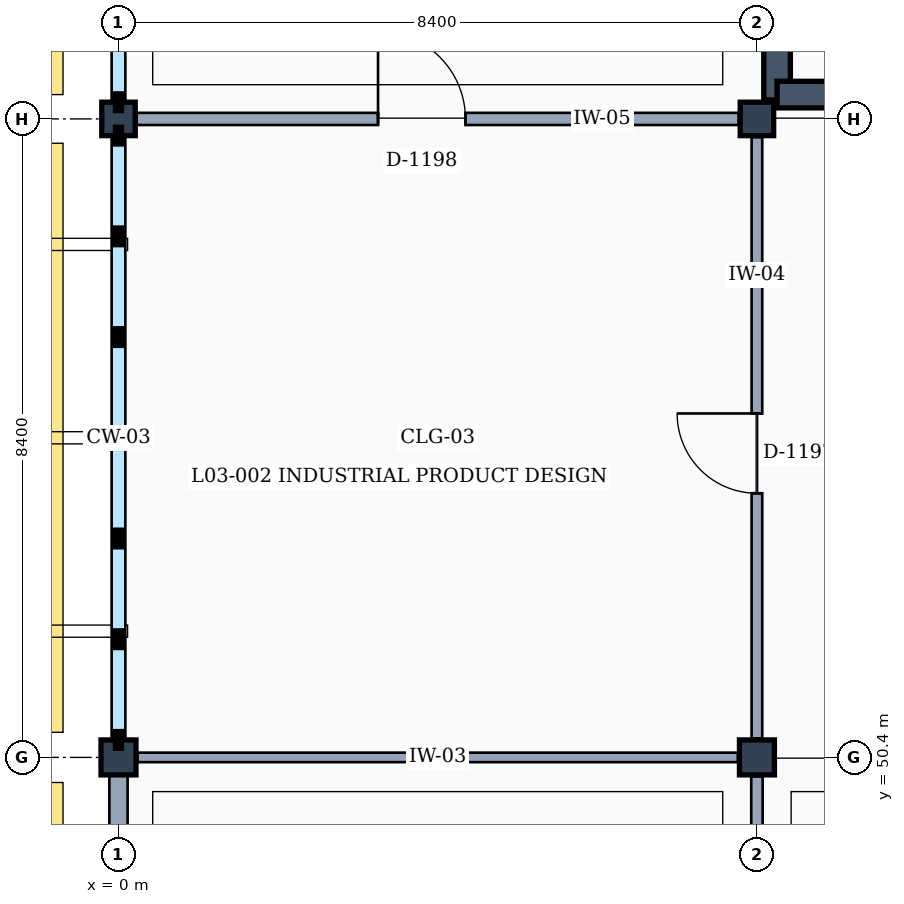
"""IFC4 building model, lengths in metres.
Left out: names, types, materials, properties, quantities, classifications, styles, units other than length and angle.
Written with IfcOpenShell. Run it as: python <this file> out.ifc"""

import sys

from ifc_helpers import new_model, si_unit, direction, frame, frame_2d, origin, origin_2d, place, context, subcontext, project, spatial, rectangle, extrude, element, fill, save


model = new_model("IFC4")
c1 = context("Model", 3, precision=1e-05, world=origin(), true_north=direction((0.0, 1.0)))
c2 = subcontext(c1, "Body", "Model", "MODEL_VIEW")
j1 = project(units=[si_unit("LENGTHUNIT", "METRE"), si_unit("PLANEANGLEUNIT", "RADIAN")], contexts=[c1])
p1 = place(None, origin())
s1 = spatial("IfcSite", under=j1, at=p1, CompositionType="ELEMENT")
p2 = place(p1, origin())
s2 = spatial("IfcBuilding", under=s1, at=p2, CompositionType="ELEMENT")
p3 = place(p2, frame((0.0, 0.0, 13.8)))
s3 = spatial("IfcBuildingStorey", under=s2, at=p3, CompositionType="ELEMENT", Elevation=13.8)
p4 = place(p3, frame((0.0, 50.4, 0.0), z_axis=(0.0, 0.0, 1.0), x_axis=(1.0, 0.0, 0.0)))
e1 = element("IfcColumn", 1, at=p4, inside=s3, PredefinedType="COLUMN", context=c2, shape_type="SweptSolid", body=[
    extrude(rectangle(XDim=0.46, YDim=0.46, at=origin_2d()), origin(), (0.0, 0.0, 1.0), 4.2),
])
p5 = place(p3, frame((0.0, 58.8, 0.0), z_axis=(0.0, 0.0, 1.0), x_axis=(1.0, 0.0, 0.0)))
e2 = element("IfcColumn", 2, at=p5, inside=s3, PredefinedType="COLUMN", context=c2, shape_type="SweptSolid", body=[
    extrude(rectangle(XDim=0.44, YDim=0.44, at=origin_2d()), origin(), (0.0, 0.0, 1.0), 4.2),
])
p6 = place(p3, frame((8.4, 50.4, 0.0), z_axis=(0.0, 0.0, 1.0), x_axis=(1.0, 0.0, 0.0)))
e3 = element("IfcColumn", 3, at=p6, inside=s3, PredefinedType="COLUMN", context=c2, shape_type="SweptSolid", body=[
    extrude(rectangle(XDim=0.46, YDim=0.46, at=origin_2d()), origin(), (0.0, 0.0, 1.0), 4.2),
])
p7 = place(p3, frame((8.4, 58.8, 0.0), z_axis=(0.0, 0.0, 1.0), x_axis=(1.0, 0.0, 0.0)))
e4 = element("IfcColumn", 4, at=p7, inside=s3, PredefinedType="COLUMN", context=c2, shape_type="SweptSolid", body=[
    extrude(rectangle(XDim=0.44, YDim=0.44, at=origin_2d()), origin(), (0.0, 0.0, 1.0), 4.2),
])
p8 = place(p3, frame((0.0, 42.17, 0.0), z_axis=(0.0, 0.0, 1.0), x_axis=(0.0, 1.0, 0.0)))
e5 = element("IfcWall", 5, at=p8, inside=s3, PredefinedType="SOLIDWALL", context=c2, shape_type="SweptSolid", body=[
    extrude(rectangle(XDim=8.0, YDim=0.24, at=frame_2d((4.0, 0.0))), origin(), (0.0, 0.0, 1.0), 3.36),
])
p9 = place(p8, frame((3.2, 0.0, 0.9)))
e6 = element("IfcOpeningElement", 6, at=p9, cuts=e5, PredefinedType="OPENING", context=c2, shape_type="SweptSolid", body=[
    extrude(rectangle(XDim=1.6, YDim=2.0, at=frame_2d((0.8, 1.0))), frame((0.0, 0.13, 0.0), z_axis=(0.0, -1.0, 0.0), x_axis=(1.0, 0.0, 0.0)), (0.0, 0.0, 1.0), 0.26),
])
p10 = place(p3, frame((8.665, 59.05, 0.0), z_axis=(0.0, 0.0, 1.0), x_axis=(0.0, 1.0, 0.0)))
e7 = element("IfcWall", 7, at=p10, inside=s3, PredefinedType="SHEAR", context=c2, shape_type="SweptSolid", body=[
    extrude(rectangle(XDim=7.94, YDim=0.35, at=frame_2d((3.97, 0.0))), origin(), (0.0, 0.0, 1.0), 3.98),
])
p11 = place(p3, frame((16.54, 59.12, 0.0), z_axis=(0.0, 0.0, 1.0), x_axis=(-1.0, 0.0, 0.0)))
e8 = element("IfcWall", 8, at=p11, inside=s3, PredefinedType="SHEAR", context=c2, shape_type="SweptSolid", body=[
    extrude(rectangle(XDim=7.875, YDim=0.35, at=frame_2d((3.938, 0.0))), origin(), (0.0, 0.0, 1.0), 3.98),
])
p12 = place(p3, frame((8.4, 42.19, 0.0), z_axis=(0.0, 0.0, 1.0), x_axis=(0.0, 1.0, 0.0)))
e9 = element("IfcWall", 9, at=p12, inside=s3, PredefinedType="PARTITIONING", context=c2, shape_type="SweptSolid", body=[
    extrude(rectangle(XDim=7.96, YDim=0.15, at=frame_2d((3.98, 0.0))), origin(), (0.0, 0.0, 1.0), 3.32),
])
p13 = place(p12, frame((2.925, 0.0, 0.0)))
e10 = element("IfcOpeningElement", 10, at=p13, cuts=e9, PredefinedType="OPENING", context=c2, shape_type="SweptSolid", body=[
    extrude(rectangle(XDim=1.65, YDim=2.25, at=frame_2d((0.825, 1.125))), frame((0.0, 0.085, 0.0), z_axis=(0.0, -1.0, 0.0), x_axis=(1.0, 0.0, 0.0)), (0.0, 0.0, 1.0), 0.17),
])
p14 = place(p3, frame((0.25, 50.4, 0.0), z_axis=(0.0, 0.0, 1.0), x_axis=(1.0, 0.0, 0.0)))
e11 = element("IfcWall", 11, at=p14, inside=s3, PredefinedType="PARTITIONING", context=c2, shape_type="SweptSolid", body=[
    extrude(rectangle(XDim=7.9, YDim=0.125, at=frame_2d((3.95, 0.0))), origin(), (0.0, 0.0, 1.0), 3.32),
])
p15 = place(p3, frame((8.4, 50.65, 0.0), z_axis=(0.0, 0.0, 1.0), x_axis=(0.0, 1.0, 0.0)))
e12 = element("IfcWall", 12, at=p15, inside=s3, PredefinedType="PARTITIONING", context=c2, shape_type="SweptSolid", body=[
    extrude(rectangle(XDim=7.91, YDim=0.14, at=frame_2d((3.955, 0.0))), origin(), (0.0, 0.0, 1.0), 3.32),
])
p16 = place(p15, frame((3.225, 0.0, 0.0)))
e13 = element("IfcOpeningElement", 13, at=p16, cuts=e12, PredefinedType="OPENING", context=c2, shape_type="SweptSolid", body=[
    extrude(rectangle(XDim=1.05, YDim=2.2, at=frame_2d((0.525, 1.1))), frame((0.0, 0.08, 0.0), z_axis=(0.0, -1.0, 0.0), x_axis=(1.0, 0.0, 0.0)), (0.0, 0.0, 1.0), 0.16),
])
p17 = place(p3, frame((0.24, 58.8, 0.0), z_axis=(0.0, 0.0, 1.0), x_axis=(1.0, 0.0, 0.0)))
e14 = element("IfcWall", 14, at=p17, inside=s3, PredefinedType="PARTITIONING", context=c2, shape_type="SweptSolid", body=[
    extrude(rectangle(XDim=7.92, YDim=0.16, at=frame_2d((3.96, 0.0))), origin(), (0.0, 0.0, 1.0), 3.32),
])
p18 = place(p17, frame((3.175, 0.0, 0.0)))
e15 = element("IfcOpeningElement", 15, at=p18, cuts=e14, PredefinedType="OPENING", context=c2, shape_type="SweptSolid", body=[
    extrude(rectangle(XDim=1.15, YDim=2.25, at=frame_2d((0.575, 1.125))), frame((0.0, 0.09, 0.0), z_axis=(0.0, -1.0, 0.0), x_axis=(1.0, 0.0, 0.0)), (0.0, 0.0, 1.0), 0.18),
])
p19 = place(p16, origin())
e16 = element("IfcDoor", 16, at=p19, inside=s3, OperationType="SINGLE_SWING_RIGHT", PredefinedType="DOOR", context=c2, shape_type="SweptSolid", body=[
    extrude(rectangle(XDim=1.05, YDim=2.2, at=frame_2d((0.525, 1.1))), frame((0.0, 0.025, 0.0), z_axis=(0.0, -1.0, 0.0), x_axis=(1.0, 0.0, 0.0)), (0.0, 0.0, 1.0), 0.05),
])
fill(e13, e16)
p20 = place(p18, origin())
e17 = element("IfcDoor", 17, at=p20, inside=s3, OperationType="SINGLE_SWING_LEFT", PredefinedType="DOOR", context=c2, shape_type="SweptSolid", body=[
    extrude(rectangle(XDim=1.15, YDim=2.25, at=frame_2d((0.575, 1.125))), frame((0.0, 0.025, 0.0), z_axis=(0.0, -1.0, 0.0), x_axis=(1.0, 0.0, 0.0)), (0.0, 0.0, 1.0), 0.05),
])
fill(e15, e17)
save(model, sys.argv[1])
